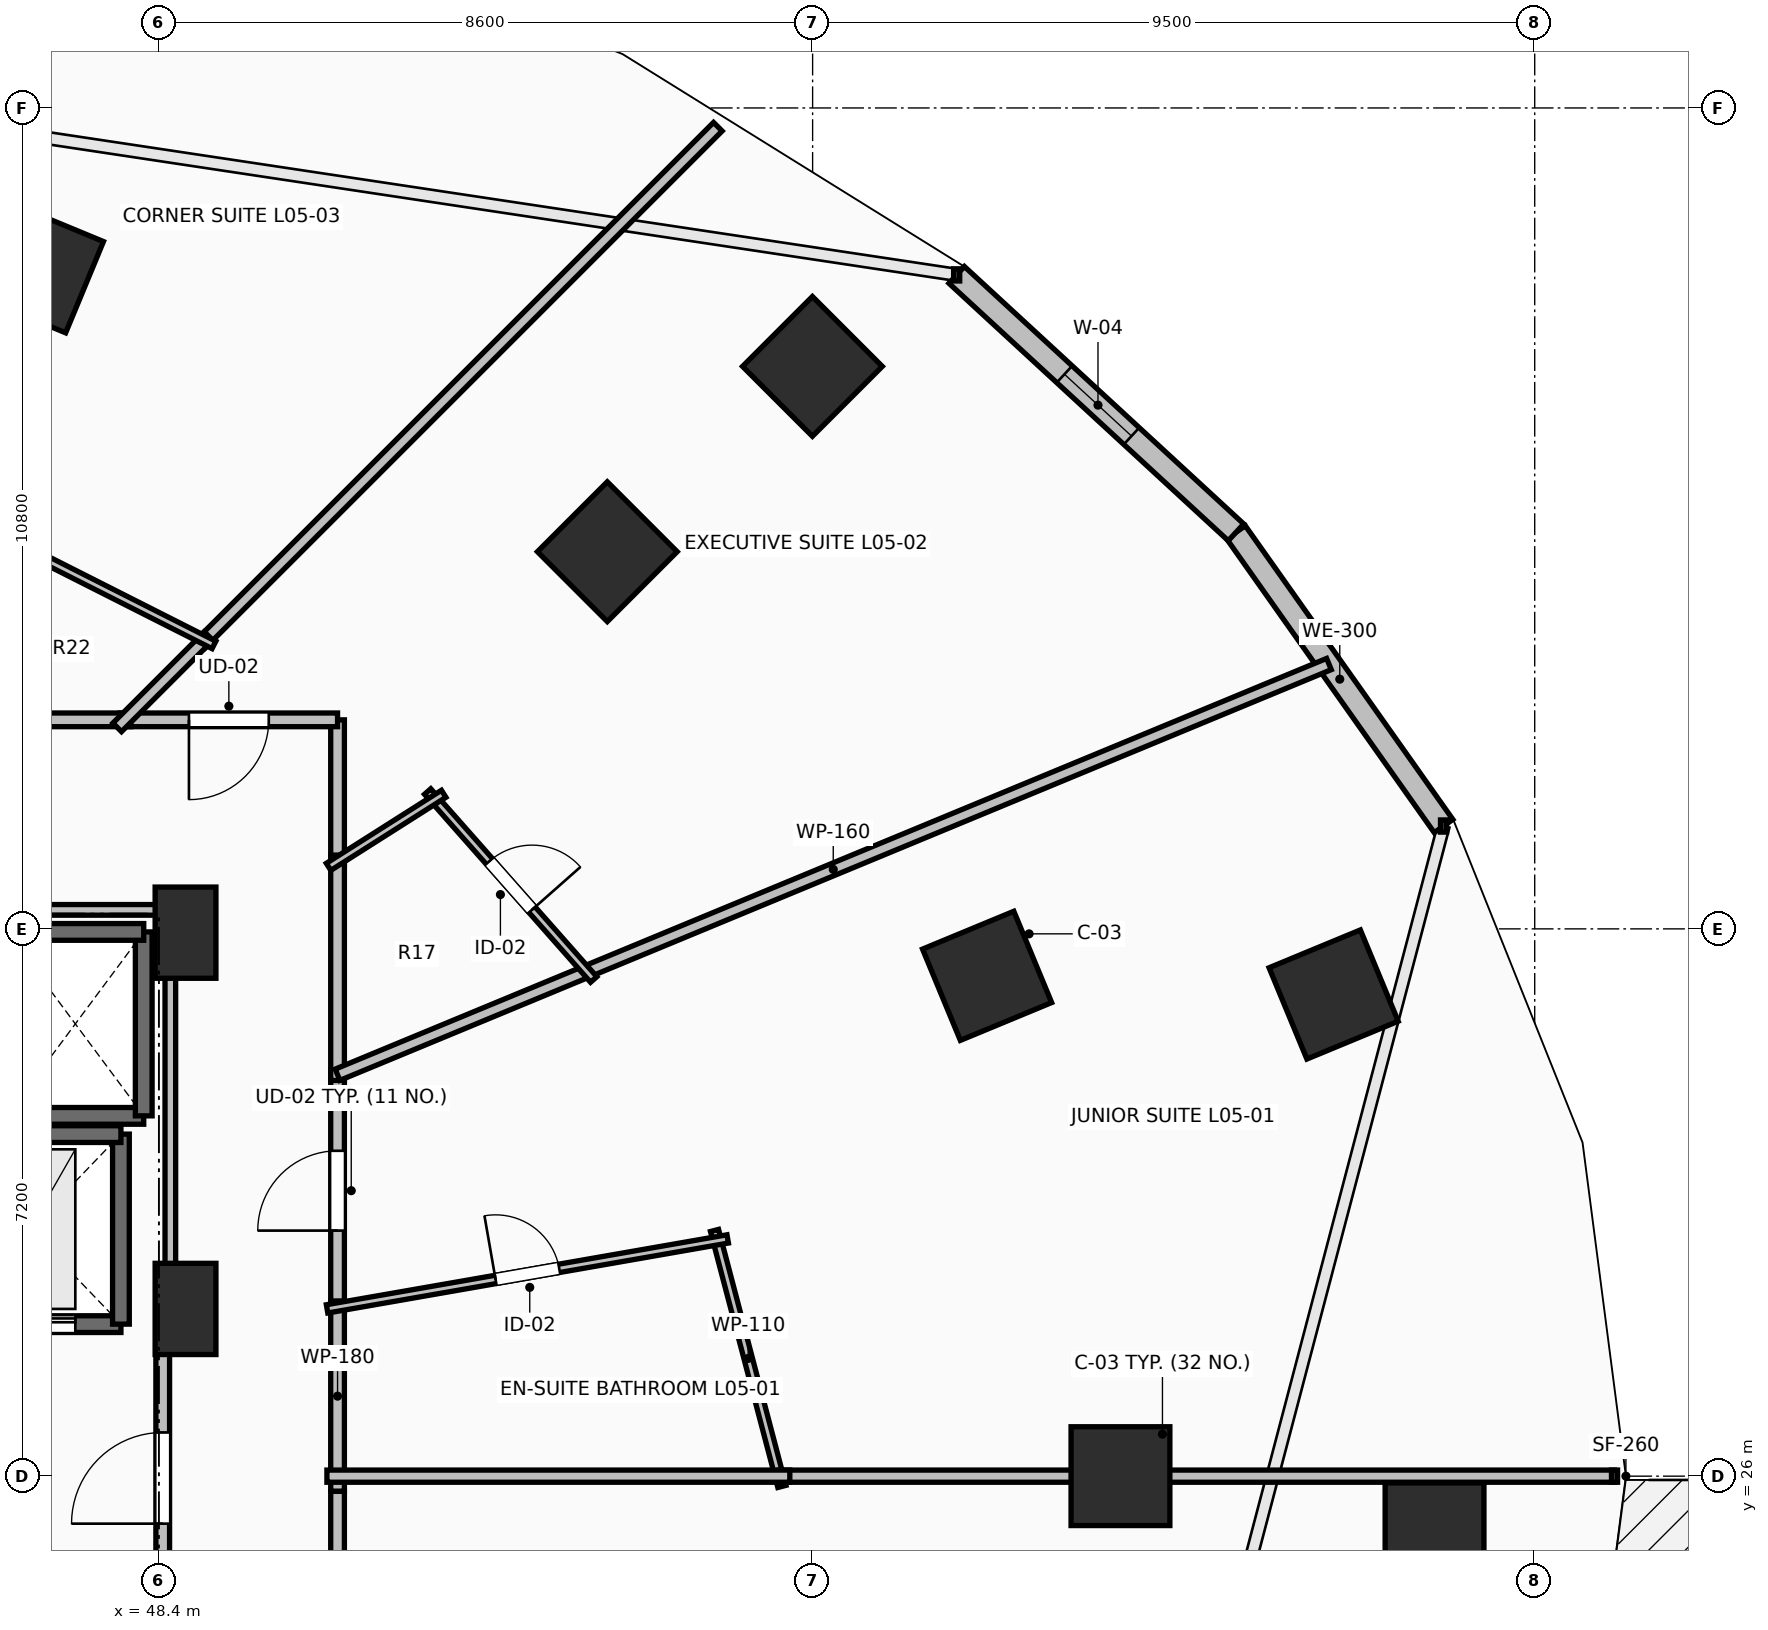
"""IFC4 building model, lengths in metres.
Left out: names, types, materials, properties, quantities, classifications, styles, units other than length and angle.
Written with IfcOpenShell. Run it as: python <this file> out.ifc"""

import sys

from ifc_helpers import new_model, si_unit, direction, frame, frame_2d, origin, origin_2d, place, context, subcontext, project, spatial, rectangle, extrude, element, fill, save


model = new_model("IFC4")
c1 = context("Model", 3, precision=1e-05, world=origin(), true_north=direction((0.0, 1.0)))
c2 = subcontext(c1, "Body", "Model", "MODEL_VIEW")
j1 = project(units=[si_unit("LENGTHUNIT", "METRE"), si_unit("PLANEANGLEUNIT", "RADIAN")], contexts=[c1])
p1 = place(None, origin())
s1 = spatial("IfcSite", under=j1, at=p1, CompositionType="ELEMENT")
p2 = place(p1, origin())
s2 = spatial("IfcBuilding", under=s1, at=p2, CompositionType="ELEMENT")
p3 = place(p2, frame((0.0, 0.0, 24.0)))
s3 = spatial("IfcBuildingStorey", under=s2, at=p3, CompositionType="ELEMENT", Elevation=24.0)
for number, where, z_axis, x_axis in (
    (1, (61.05, 26.0, 0.0), (0.0, 0.0, 1.0), (1.0, 0.0, 0.0)),
    (2, (59.295, 32.582, 0.0), (0.0, 0.0, 1.0), (0.924, 0.383, 0.0)),
    (3, (54.299, 38.162, 0.0), (0.0, 0.0, 1.0), (0.707, 0.707, 0.0)),
    (4, (46.821, 41.891, 0.0), (0.0, 0.0, 1.0), (0.383, 0.924, 0.0)),
    (5, (65.182, 25.261, 0.0), (0.0, 0.0, 1.0), (1.0, 0.0, 0.0)),
    (6, (63.854, 32.337, 0.0), (0.0, 0.0, 1.0), (0.924, 0.383, 0.0)),
    (7, (56.997, 40.6, 0.0), (0.0, 0.0, 1.0), (0.707, 0.707, 0.0)),
):
    element("IfcColumn", number, at=place(p3, frame(where, z_axis=z_axis, x_axis=x_axis)), inside=s3, PredefinedType="COLUMN", context=c2, shape_type="SweptSolid", body=[
        extrude(rectangle(XDim=1.3, YDim=1.3, at=origin_2d()), origin(), (0.0, 0.0, 1.0), 3.5),
    ])
for number, where, z_axis, x_axis in (
    (8, (48.75, 33.15, 0.0), (0.0, 0.0, 1.0), (1.0, 0.0, 0.0)),
    (9, (48.75, 28.2, 0.0), (0.0, 0.0, 1.0), (1.0, 0.0, 0.0)),
):
    element("IfcColumn", number, at=place(p3, frame(where, z_axis=z_axis, x_axis=x_axis)), inside=s3, PredefinedType="PILASTER", context=c2, shape_type="SweptSolid", body=[
        extrude(rectangle(XDim=0.8, YDim=1.2, at=origin_2d()), origin(), (0.0, 0.0, 1.0), 3.5),
    ])
p4 = place(p3, frame((65.301, 34.553, 0.0), z_axis=(0.0, 0.0, 1.0), x_axis=(-0.577130815624, 0.816651713803, 0.0)))
e10 = element("IfcWall", 10, at=p4, inside=s3, PredefinedType="STANDARD", context=c2, shape_type="SweptSolid", body=[
    extrude(rectangle(XDim=4.731, YDim=0.3, at=frame_2d((2.366, 0.0))), origin(), (0.0, 0.0, 1.0), 3.24),
])
p5 = place(p3, frame((62.57, 38.417, 0.0), z_axis=(0.0, 0.0, 1.0), x_axis=(-0.735342629635, 0.677695519419, 0.0)))
e11 = element("IfcWall", 11, at=p5, inside=s3, PredefinedType="STANDARD", context=c2, shape_type="SweptSolid", body=[
    extrude(rectangle(XDim=4.997, YDim=0.3, at=frame_2d((2.499, 0.0))), origin(), (0.0, 0.0, 1.0), 3.24),
])
p6 = place(p5, frame((1.869, 0.0, 0.85)))
e12 = element("IfcOpeningElement", 12, at=p6, cuts=e11, PredefinedType="OPENING", context=c2, shape_type="SweptSolid", body=[
    extrude(rectangle(XDim=1.2, YDim=1.95, at=frame_2d((0.6, 0.975))), frame((0.0, 0.165, 0.0), z_axis=(0.0, -1.0, 0.0), x_axis=(1.0, 0.0, 0.0)), (0.0, 0.0, 1.0), 0.33),
])
p7 = place(p3, frame((46.4, 30.74, 0.0), z_axis=(0.0, 0.0, 1.0), x_axis=(1.0, 0.0, 0.0)))
e13 = element("IfcWall", 13, at=p7, inside=s3, PredefinedType="SOLIDWALL", context=c2, shape_type="SweptSolid", body=[
    extrude(rectangle(XDim=1.8, YDim=0.22, at=frame_2d((0.9, 0.0))), origin(), (0.0, 0.0, 1.0), 3.24),
])
p8 = place(p3, frame((48.2, 30.74, 0.0), z_axis=(0.0, 0.0, 1.0), x_axis=(0.0, 1.0, 0.0)))
e14 = element("IfcWall", 14, at=p8, inside=s3, PredefinedType="SOLIDWALL", context=c2, shape_type="SweptSolid", body=[
    extrude(rectangle(XDim=2.42, YDim=0.22, at=frame_2d((1.21, 0.0))), origin(), (0.0, 0.0, 1.0), 3.24),
])
p9 = place(p3, frame((48.2, 33.16, 0.0), z_axis=(0.0, 0.0, 1.0), x_axis=(-1.0, 0.0, 0.0)))
e15 = element("IfcWall", 15, at=p9, inside=s3, PredefinedType="SOLIDWALL", context=c2, shape_type="SweptSolid", body=[
    extrude(rectangle(XDim=1.8, YDim=0.22, at=frame_2d((0.9, 0.0))), origin(), (0.0, 0.0, 1.0), 3.24),
])
p10 = place(p3, frame((45.5, 28.0, 0.0), z_axis=(0.0, 0.0, 1.0), x_axis=(1.0, 0.0, 0.0)))
e16 = element("IfcWall", 16, at=p10, inside=s3, PredefinedType="SHEAR", context=c2, shape_type="SweptSolid", body=[
    extrude(rectangle(XDim=2.4, YDim=0.22, at=frame_2d((1.2, 0.0))), origin(), (0.0, 0.0, 1.0), 3.24),
])
p11 = place(p10, frame((0.6, 0.0, 0.0)))
e17 = element("IfcOpeningElement", 17, at=p11, cuts=e16, PredefinedType="OPENING", context=c2, shape_type="SweptSolid", body=[
    extrude(rectangle(XDim=1.2, YDim=2.2, at=frame_2d((0.6, 1.1))), frame((0.0, 0.125, 0.0), z_axis=(0.0, -1.0, 0.0), x_axis=(1.0, 0.0, 0.0)), (0.0, 0.0, 1.0), 0.25),
])
p12 = place(p3, frame((47.9, 28.0, 0.0), z_axis=(0.0, 0.0, 1.0), x_axis=(0.0, 1.0, 0.0)))
e18 = element("IfcWall", 18, at=p12, inside=s3, PredefinedType="SHEAR", context=c2, shape_type="SweptSolid", body=[
    extrude(rectangle(XDim=2.5, YDim=0.22, at=frame_2d((1.25, 0.0))), origin(), (0.0, 0.0, 1.0), 3.24),
])
p13 = place(p3, frame((47.9, 30.5, 0.0), z_axis=(0.0, 0.0, 1.0), x_axis=(-1.0, 0.0, 0.0)))
e19 = element("IfcWall", 19, at=p13, inside=s3, PredefinedType="SHEAR", context=c2, shape_type="SweptSolid", body=[
    extrude(rectangle(XDim=2.4, YDim=0.22, at=frame_2d((1.2, 0.0))), origin(), (0.0, 0.0, 1.0), 3.24),
])
p14 = place(p3, frame((48.45, 23.95, 0.0), z_axis=(0.0, 0.0, 1.0), x_axis=(0.0, 1.0, 0.0)))
e20 = element("IfcWall", 20, at=p14, inside=s3, PredefinedType="PARTITIONING", context=c2, shape_type="SweptSolid", body=[
    extrude(rectangle(XDim=4.05, YDim=0.18, at=frame_2d((2.025, 0.0))), origin(), (0.0, 0.0, 1.0), 3.24),
])
p15 = place(p14, frame((1.425, 0.0, 0.0)))
e21 = element("IfcOpeningElement", 21, at=p15, cuts=e20, PredefinedType="OPENING", context=c2, shape_type="SweptSolid", body=[
    extrude(rectangle(XDim=1.2, YDim=2.15, at=frame_2d((0.6, 1.075))), frame((0.0, 0.105, 0.0), z_axis=(0.0, -1.0, 0.0), x_axis=(1.0, 0.0, 0.0)), (0.0, 0.0, 1.0), 0.21),
])
p16 = place(p3, frame((50.75, 28.165, 0.0), z_axis=(0.0, 0.0, 1.0), x_axis=(0.0, 1.0, 0.0)))
e22 = element("IfcWall", 22, at=p16, inside=s3, PredefinedType="PARTITIONING", context=c2, shape_type="SweptSolid", body=[
    extrude(rectangle(XDim=3.181, YDim=0.18, at=frame_2d((1.59, 0.0))), origin(), (0.0, 0.0, 1.0), 3.24),
])
p17 = place(p16, frame((1.065, 0.0, 0.0)))
e23 = element("IfcOpeningElement", 23, at=p17, cuts=e22, PredefinedType="OPENING", context=c2, shape_type="SweptSolid", body=[
    extrude(rectangle(XDim=1.05, YDim=2.2, at=frame_2d((0.525, 1.1))), frame((0.0, 0.105, 0.0), z_axis=(0.0, -1.0, 0.0), x_axis=(1.0, 0.0, 0.0)), (0.0, 0.0, 1.0), 0.21),
])
p18 = place(p3, frame((50.75, 25.8, 0.0), z_axis=(0.0, 0.0, 1.0), x_axis=(0.0, 1.0, 0.0)))
e24 = element("IfcWall", 24, at=p18, inside=s3, PredefinedType="PARTITIONING", context=c2, shape_type="SweptSolid", body=[
    extrude(rectangle(XDim=2.505, YDim=0.18, at=frame_2d((1.252, 0.0))), origin(), (0.0, 0.0, 1.0), 2.432),
])
p19 = place(p3, frame((50.75, 34.031, 0.0), z_axis=(0.0, 0.0, 1.0), x_axis=(0.0, 1.0, 0.0)))
e25 = element("IfcWall", 25, at=p19, inside=s3, PredefinedType="PARTITIONING", context=c2, shape_type="SweptSolid", body=[
    extrude(rectangle(XDim=1.919, YDim=0.18, at=frame_2d((0.959, 0.0))), origin(), (0.0, 0.0, 1.0), 2.432),
])
p20 = place(p3, frame((50.75, 35.95, 0.0), z_axis=(0.0, 0.0, 1.0), x_axis=(-1.0, 0.0, 0.0)))
e26 = element("IfcWall", 26, at=p20, inside=s3, PredefinedType="PARTITIONING", context=c2, shape_type="SweptSolid", body=[
    extrude(rectangle(XDim=2.86, YDim=0.18, at=frame_2d((1.43, 0.0))), origin(), (0.0, 0.0, 1.0), 2.432),
])
p21 = place(p20, frame((0.905, 0.0, 0.0)))
e27 = element("IfcOpeningElement", 27, at=p21, cuts=e26, PredefinedType="OPENING", context=c2, shape_type="SweptSolid", body=[
    extrude(rectangle(XDim=1.05, YDim=2.2, at=frame_2d((0.525, 1.1))), frame((0.0, 0.105, 0.0), z_axis=(0.0, -1.0, 0.0), x_axis=(1.0, 0.0, 0.0)), (0.0, 0.0, 1.0), 0.21),
])
p22 = place(p3, frame((50.75, 31.206, 0.0), z_axis=(0.0, 0.0, 1.0), x_axis=(0.0, 1.0, 0.0)))
e28 = element("IfcWall", 28, at=p22, inside=s3, PredefinedType="PARTITIONING", context=c2, shape_type="SweptSolid", body=[
    extrude(rectangle(XDim=2.965, YDim=0.18, at=frame_2d((1.482, 0.0))), origin(), (0.0, 0.0, 1.0), 2.432),
])
p23 = place(p3, frame((48.03, 35.95, 0.0), z_axis=(0.0, 0.0, 1.0), x_axis=(-1.0, 0.0, 0.0)))
e29 = element("IfcWall", 29, at=p23, inside=s3, PredefinedType="PARTITIONING", context=c2, shape_type="SweptSolid", body=[
    extrude(rectangle(XDim=3.104, YDim=0.18, at=frame_2d((1.552, 0.0))), origin(), (0.0, 0.0, 1.0), 2.432),
])
p24 = place(p3, frame((50.75, 14.1, 0.0), z_axis=(0.0, 0.0, 1.0), x_axis=(0.0, 1.0, 0.0)))
e30 = element("IfcWall", 30, at=p24, inside=s3, PredefinedType="PARTITIONING", context=c2, shape_type="SweptSolid", body=[
    extrude(rectangle(XDim=11.7, YDim=0.18, at=frame_2d((5.85, 0.0))), origin(), (0.0, 0.0, 1.0), 2.432),
])
p25 = place(p24, frame((5.35, 0.0, 0.0)))
e31 = element("IfcOpeningElement", 31, at=p25, cuts=e30, PredefinedType="OPENING", context=c2, shape_type="SweptSolid", body=[
    extrude(rectangle(XDim=1.0, YDim=2.15, at=frame_2d((0.5, 1.075))), frame((0.0, 0.105, 0.0), z_axis=(0.0, -1.0, 0.0), x_axis=(1.0, 0.0, 0.0)), (0.0, 0.0, 1.0), 0.21),
])
p26 = place(p3, frame((55.709, 29.232, 0.0), z_axis=(0.0, 0.0, 1.0), x_axis=(0.254476045764, -0.967079077497, 0.0)))
e32 = element("IfcWall", 32, at=p26, inside=s3, PredefinedType="PARTITIONING", context=c2, shape_type="SweptSolid", body=[
    extrude(rectangle(XDim=3.483, YDim=0.11, at=frame_2d((1.741, 0.0))), origin(), (0.0, 0.0, 1.0), 2.432),
])
p27 = place(p3, frame((50.612, 28.201, 0.0), z_axis=(0.0, 0.0, 1.0), x_axis=(0.985100697644, 0.171978532096, 0.0)))
e33 = element("IfcWall", 33, at=p27, inside=s3, PredefinedType="PARTITIONING", context=c2, shape_type="SweptSolid", body=[
    extrude(rectangle(XDim=5.351, YDim=0.11, at=frame_2d((2.675, 0.0))), origin(), (0.0, 0.0, 1.0), 2.922),
])
p28 = place(p27, frame((2.25, 0.0, 0.0)))
e34 = element("IfcOpeningElement", 34, at=p28, cuts=e33, PredefinedType="OPENING", context=c2, shape_type="SweptSolid", body=[
    extrude(rectangle(XDim=0.85, YDim=2.1, at=frame_2d((0.425, 1.05))), frame((0.0, 0.07, 0.0), z_axis=(0.0, -1.0, 0.0), x_axis=(1.0, 0.0, 0.0)), (0.0, 0.0, 1.0), 0.14),
])
p29 = place(p3, frame((63.793, 36.684, 0.0), z_axis=(0.0, 0.0, 1.0), x_axis=(-0.923866969846, -0.382713759914, 0.0)))
e35 = element("IfcWall", 35, at=p29, inside=s3, PredefinedType="PARTITIONING", context=c2, shape_type="SweptSolid", body=[
    extrude(rectangle(XDim=14.118, YDim=0.16, at=frame_2d((7.059, 0.0))), origin(), (0.0, 0.0, 1.0), 2.432),
])
p30 = place(p3, frame((56.56, 26.0, 0.0), z_axis=(0.0, 0.0, 1.0), x_axis=(1.0, 0.0, 0.0)))
e36 = element("IfcWall", 36, at=p30, inside=s3, PredefinedType="PARTITIONING", context=c2, shape_type="SweptSolid", body=[
    extrude(rectangle(XDim=10.989, YDim=0.16, at=frame_2d((5.495, 0.0))), origin(), (0.0, 0.0, 1.0), 2.432),
])
p31 = place(p3, frame((50.61, 26.0, 0.0), z_axis=(0.0, 0.0, 1.0), x_axis=(1.0, 0.0, 0.0)))
e37 = element("IfcWall", 37, at=p31, inside=s3, PredefinedType="PARTITIONING", context=c2, shape_type="SweptSolid", body=[
    extrude(rectangle(XDim=6.09, YDim=0.16, at=frame_2d((3.045, 0.0))), origin(), (0.0, 0.0, 1.0), 2.432),
])
p32 = place(p3, frame((51.935, 35.007, 0.0), z_axis=(0.0, 0.0, 1.0), x_axis=(0.662059609276, -0.749451181709, 0.0)))
e38 = element("IfcWall", 38, at=p32, inside=s3, PredefinedType="PARTITIONING", context=c2, shape_type="SweptSolid", body=[
    extrude(rectangle(XDim=3.299, YDim=0.11, at=frame_2d((1.65, 0.0))), origin(), (0.0, 0.0, 1.0), 2.432),
])
p33 = place(p32, frame((1.225, 0.0, 0.0)))
e39 = element("IfcOpeningElement", 39, at=p33, cuts=e38, PredefinedType="OPENING", context=c2, shape_type="SweptSolid", body=[
    extrude(rectangle(XDim=0.85, YDim=2.1, at=frame_2d((0.425, 1.05))), frame((0.0, 0.07, 0.0), z_axis=(0.0, -1.0, 0.0), x_axis=(1.0, 0.0, 0.0)), (0.0, 0.0, 1.0), 0.14),
])
p34 = place(p3, frame((50.632, 34.016, 0.0), z_axis=(0.0, 0.0, 1.0), x_axis=(0.844361394482, 0.535774052665, 0.0)))
e40 = element("IfcWall", 40, at=p34, inside=s3, PredefinedType="PARTITIONING", context=c2, shape_type="SweptSolid", body=[
    extrude(rectangle(XDim=1.793, YDim=0.11, at=frame_2d((0.897, 0.0))), origin(), (0.0, 0.0, 1.0), 2.922),
])
p35 = place(p3, frame((55.753, 43.753, 0.0), z_axis=(0.0, 0.0, 1.0), x_axis=(-0.707106781187, -0.707106781187, 0.0)))
e41 = element("IfcWall", 41, at=p35, inside=s3, PredefinedType="PARTITIONING", context=c2, shape_type="SweptSolid", body=[
    extrude(rectangle(XDim=9.615, YDim=0.16, at=frame_2d((4.808, 0.0))), origin(), (0.0, 0.0, 1.0), 2.624),
])
p36 = place(p3, frame((49.053, 37.053, 0.0), z_axis=(0.0, 0.0, 1.0), x_axis=(-0.707106781187, -0.707106781187, 0.0)))
e42 = element("IfcWall", 42, at=p36, inside=s3, PredefinedType="PARTITIONING", context=c2, shape_type="SweptSolid", body=[
    extrude(rectangle(XDim=1.7, YDim=0.16, at=frame_2d((0.85, 0.0))), origin(), (0.0, 0.0, 1.0), 2.432),
])
p37 = place(p3, frame((46.462, 38.281, 0.0), z_axis=(0.0, 0.0, 1.0), x_axis=(0.892486842203, -0.451073426944, 0.0)))
e43 = element("IfcWall", 43, at=p37, inside=s3, PredefinedType="PARTITIONING", context=c2, shape_type="SweptSolid", body=[
    extrude(rectangle(XDim=2.982, YDim=0.11, at=frame_2d((1.491, 0.0))), origin(), (0.0, 0.0, 1.0), 2.432),
])
p38 = place(p3, frame((44.34, 33.45, 0.0), z_axis=(0.0, 0.0, 1.0), x_axis=(1.0, 0.0, 0.0)))
e44 = element("IfcWall", 44, at=p38, inside=s3, PredefinedType="PARTITIONING", context=c2, shape_type="SweptSolid", body=[
    extrude(rectangle(XDim=4.21, YDim=0.14, at=frame_2d((2.105, 0.0))), origin(), (0.0, 0.0, 1.0), 2.432),
])
p39 = place(p3, frame((48.55, 33.45, 0.0), z_axis=(0.0, 0.0, 1.0), x_axis=(0.0, -1.0, 0.0)))
e45 = element("IfcWall", 45, at=p39, inside=s3, PredefinedType="PARTITIONING", context=c2, shape_type="SweptSolid", body=[
    extrude(rectangle(XDim=5.254, YDim=0.14, at=frame_2d((2.627, 0.0))), origin(), (0.0, 0.0, 1.0), 2.432),
])
p40 = place(p6, origin())
e46 = element("IfcWindow", 46, at=p40, inside=s3, PartitioningType="SINGLE_PANEL", PredefinedType="WINDOW", context=c2, shape_type="SweptSolid", body=[
    extrude(rectangle(XDim=1.2, YDim=1.95, at=frame_2d((0.6, 0.975))), frame((0.0, 0.03, 0.0), z_axis=(0.0, -1.0, 0.0), x_axis=(1.0, 0.0, 0.0)), (0.0, 0.0, 1.0), 0.06),
])
fill(e12, e46)
p41 = place(p11, origin())
e47 = element("IfcDoor", 47, at=p41, inside=s3, OperationType="SLIDING_TO_LEFT", PredefinedType="DOOR", context=c2, shape_type="SweptSolid", body=[
    extrude(rectangle(XDim=1.2, YDim=2.2, at=frame_2d((0.6, 1.1))), frame((0.0, 0.025, 0.0), z_axis=(0.0, -1.0, 0.0), x_axis=(1.0, 0.0, 0.0)), (0.0, 0.0, 1.0), 0.05),
])
fill(e17, e47)
p42 = place(p15, origin())
e48 = element("IfcDoor", 48, at=p42, inside=s3, OperationType="SINGLE_SWING_LEFT", PredefinedType="DOOR", context=c2, shape_type="SweptSolid", body=[
    extrude(rectangle(XDim=1.2, YDim=2.15, at=frame_2d((0.6, 1.075))), frame((0.0, 0.025, 0.0), z_axis=(0.0, -1.0, 0.0), x_axis=(1.0, 0.0, 0.0)), (0.0, 0.0, 1.0), 0.05),
])
fill(e21, e48)
p43 = place(p17, origin())
e49 = element("IfcDoor", 49, at=p43, inside=s3, OperationType="SINGLE_SWING_LEFT", PredefinedType="DOOR", context=c2, shape_type="SweptSolid", body=[
    extrude(rectangle(XDim=1.05, YDim=2.2, at=frame_2d((0.525, 1.1))), frame((0.0, 0.025, 0.0), z_axis=(0.0, -1.0, 0.0), x_axis=(1.0, 0.0, 0.0)), (0.0, 0.0, 1.0), 0.05),
])
fill(e23, e49)
p44 = place(p21, origin())
e50 = element("IfcDoor", 50, at=p44, inside=s3, OperationType="SINGLE_SWING_RIGHT", PredefinedType="DOOR", context=c2, shape_type="SweptSolid", body=[
    extrude(rectangle(XDim=1.05, YDim=2.2, at=frame_2d((0.525, 1.1))), frame((0.0, 0.025, 0.0), z_axis=(0.0, -1.0, 0.0), x_axis=(1.0, 0.0, 0.0)), (0.0, 0.0, 1.0), 0.05),
])
fill(e27, e50)
p45 = place(p28, origin())
e51 = element("IfcDoor", 51, at=p45, inside=s3, OperationType="SINGLE_SWING_LEFT", PredefinedType="DOOR", context=c2, shape_type="SweptSolid", body=[
    extrude(rectangle(XDim=0.85, YDim=2.1, at=frame_2d((0.425, 1.05))), frame((0.0, 0.025, 0.0), z_axis=(0.0, -1.0, 0.0), x_axis=(1.0, 0.0, 0.0)), (0.0, 0.0, 1.0), 0.05),
])
fill(e34, e51)
p46 = place(p33, origin())
e52 = element("IfcDoor", 52, at=p46, inside=s3, OperationType="SINGLE_SWING_RIGHT", PredefinedType="DOOR", context=c2, shape_type="SweptSolid", body=[
    extrude(rectangle(XDim=0.85, YDim=2.1, at=frame_2d((0.425, 1.05))), frame((0.0, 0.025, 0.0), z_axis=(0.0, -1.0, 0.0), x_axis=(1.0, 0.0, 0.0)), (0.0, 0.0, 1.0), 0.05),
])
fill(e39, e52)
save(model, sys.argv[1])
